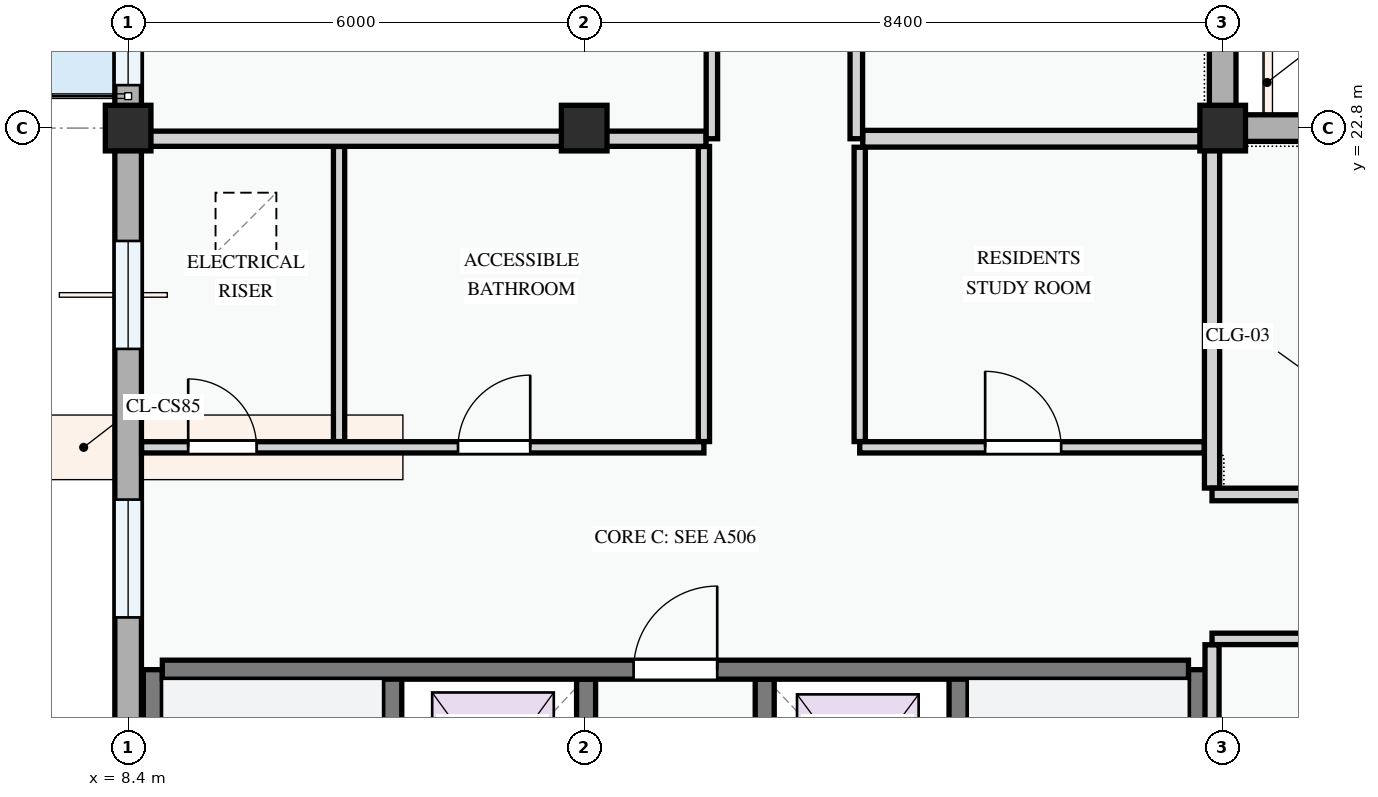
"""IFC4 building model, lengths in metres.
Left out: names, types, materials, properties, quantities, classifications, styles, units other than length and angle.
Written with IfcOpenShell. Run it as: python <this file> out.ifc"""

import sys

from ifc_helpers import new_model, si_unit, direction, frame, frame_2d, origin, origin_2d, place, context, subcontext, project, spatial, rectangle, extrude, element, fill, save


model = new_model("IFC4")
c1 = context("Model", 3, precision=1e-05, world=origin(), true_north=direction((0.0, 1.0)))
c2 = subcontext(c1, "Body", "Model", "MODEL_VIEW")
j1 = project(units=[si_unit("LENGTHUNIT", "METRE"), si_unit("PLANEANGLEUNIT", "RADIAN")], contexts=[c1])
p1 = place(None, origin())
s1 = spatial("IfcSite", under=j1, at=p1, CompositionType="ELEMENT")
p2 = place(p1, origin())
s2 = spatial("IfcBuilding", under=s1, at=p2, CompositionType="ELEMENT")
p3 = place(p2, frame((0.0, 0.0, 8.1)))
s3 = spatial("IfcBuildingStorey", under=s2, at=p3, CompositionType="ELEMENT", Elevation=8.1)
for number, where, z_axis, x_axis in (
    (1, (8.4, 22.8, 0.0), (0.0, 0.0, 1.0), (1.0, 0.0, 0.0)),
    (2, (14.4, 22.8, 0.0), (0.0, 0.0, 1.0), (1.0, 0.0, 0.0)),
    (3, (22.8, 22.8, 0.0), (0.0, 0.0, 1.0), (1.0, 0.0, 0.0)),
):
    element("IfcColumn", number, at=place(p3, frame(where, z_axis=z_axis, x_axis=x_axis)), inside=s3, PredefinedType="COLUMN", context=c2, shape_type="SweptSolid", body=[
        extrude(rectangle(XDim=0.6, YDim=0.6, at=origin_2d()), origin(), (0.0, 0.0, 1.0), 3.3),
    ])
p4 = place(p3, frame((22.8, 22.8, 0.0), z_axis=(0.0, 0.0, 1.0), x_axis=(0.0, 1.0, 0.0)))
e4 = element("IfcWall", 4, at=p4, inside=s3, PredefinedType="STANDARD", context=c2, shape_type="SweptSolid", body=[
    extrude(rectangle(XDim=6.0, YDim=0.35, at=frame_2d((3.0, 0.0))), origin(), (0.0, 0.0, 1.0), 2.575),
])
p5 = place(p4, frame((1.481, 0.0, 0.78)))
e5 = element("IfcOpeningElement", 5, at=p5, cuts=e4, PredefinedType="OPENING", context=c2, shape_type="SweptSolid", body=[
    extrude(rectangle(XDim=1.48, YDim=1.52, at=frame_2d((0.74, 0.76))), frame((0.0, 0.185, 0.0), z_axis=(0.0, -1.0, 0.0), x_axis=(1.0, 0.0, 0.0)), (0.0, 0.0, 1.0), 0.37),
])
p6 = place(p4, frame((4.581, 0.0, 0.78)))
e6 = element("IfcOpeningElement", 6, at=p6, cuts=e4, PredefinedType="OPENING", context=c2, shape_type="SweptSolid", body=[
    extrude(rectangle(XDim=0.9, YDim=1.2, at=frame_2d((0.45, 0.6))), frame((0.0, 0.185, 0.0), z_axis=(0.0, -1.0, 0.0), x_axis=(1.0, 0.0, 0.0)), (0.0, 0.0, 1.0), 0.37),
])
p7 = place(p3, frame((8.4, 28.8, 0.0), z_axis=(0.0, 0.0, 1.0), x_axis=(0.0, -1.0, 0.0)))
e7 = element("IfcWall", 7, at=p7, inside=s3, PredefinedType="STANDARD", context=c2, shape_type="SweptSolid", body=[
    extrude(rectangle(XDim=6.0, YDim=0.35, at=frame_2d((3.0, 0.0))), origin(), (0.0, 0.0, 1.0), 2.445),
])
p8 = place(p7, frame((2.14, 0.0, 0.0)))
e8 = element("IfcOpeningElement", 8, at=p8, cuts=e7, PredefinedType="OPENING", context=c2, shape_type="SweptSolid", body=[
    extrude(rectangle(XDim=1.25, YDim=2.2, at=frame_2d((0.625, 1.1))), frame((0.0, 0.185, 0.0), z_axis=(0.0, -1.0, 0.0), x_axis=(1.0, 0.0, 0.0)), (0.0, 0.0, 1.0), 0.37),
])
p9 = place(p7, frame((0.475, 0.0, 0.78)))
e9 = element("IfcOpeningElement", 9, at=p9, cuts=e7, PredefinedType="OPENING", context=c2, shape_type="SweptSolid", body=[
    extrude(rectangle(XDim=1.05, YDim=1.2, at=frame_2d((0.525, 0.6))), frame((0.0, 0.185, 0.0), z_axis=(0.0, -1.0, 0.0), x_axis=(1.0, 0.0, 0.0)), (0.0, 0.0, 1.0), 0.37),
])
p10 = place(p7, frame((3.815, 0.0, 0.78)))
e10 = element("IfcOpeningElement", 10, at=p10, cuts=e7, PredefinedType="OPENING", context=c2, shape_type="SweptSolid", body=[
    extrude(rectangle(XDim=1.62, YDim=1.38, at=frame_2d((0.81, 0.69))), frame((0.0, 0.185, 0.0), z_axis=(0.0, -1.0, 0.0), x_axis=(1.0, 0.0, 0.0)), (0.0, 0.0, 1.0), 0.37),
])
p11 = place(p3, frame((8.4, 22.8, 0.0), z_axis=(0.0, 0.0, 1.0), x_axis=(0.0, -1.0, 0.0)))
e11 = element("IfcWall", 11, at=p11, inside=s3, PredefinedType="STANDARD", context=c2, shape_type="SweptSolid", body=[
    extrude(rectangle(XDim=8.4, YDim=0.35, at=frame_2d((4.2, 0.0))), origin(), (0.0, 0.0, 1.0), 2.345),
])
p12 = place(p11, frame((1.485, 0.0, 0.78)))
e12 = element("IfcOpeningElement", 12, at=p12, cuts=e11, PredefinedType="OPENING", context=c2, shape_type="SweptSolid", body=[
    extrude(rectangle(XDim=1.42, YDim=1.38, at=frame_2d((0.71, 0.69))), frame((0.0, 0.185, 0.0), z_axis=(0.0, -1.0, 0.0), x_axis=(1.0, 0.0, 0.0)), (0.0, 0.0, 1.0), 0.37),
])
p13 = place(p11, frame((4.887, 0.0, 0.78)))
e13 = element("IfcOpeningElement", 13, at=p13, cuts=e11, PredefinedType="OPENING", context=c2, shape_type="SweptSolid", body=[
    extrude(rectangle(XDim=1.55, YDim=1.4, at=frame_2d((0.775, 0.7))), frame((0.0, 0.185, 0.0), z_axis=(0.0, -1.0, 0.0), x_axis=(1.0, 0.0, 0.0)), (0.0, 0.0, 1.0), 0.37),
])
p14 = place(p3, frame((28.8, 22.8, 0.0), z_axis=(0.0, 0.0, 1.0), x_axis=(-1.0, 0.0, 0.0)))
e14 = element("IfcWall", 14, at=p14, inside=s3, PredefinedType="STANDARD", context=c2, shape_type="SweptSolid", body=[
    extrude(rectangle(XDim=6.0, YDim=0.35, at=frame_2d((3.0, 0.0))), origin(), (0.0, 0.0, 1.0), 2.475),
])
p15 = place(p14, frame((0.519, 0.0, 0.78)))
e15 = element("IfcOpeningElement", 15, at=p15, cuts=e14, PredefinedType="OPENING", context=c2, shape_type="SweptSolid", body=[
    extrude(rectangle(XDim=0.9, YDim=1.2, at=frame_2d((0.45, 0.6))), frame((0.0, 0.185, 0.0), z_axis=(0.0, -1.0, 0.0), x_axis=(1.0, 0.0, 0.0)), (0.0, 0.0, 1.0), 0.37),
])
p16 = place(p14, frame((3.004, 0.0, 0.78)))
e16 = element("IfcOpeningElement", 16, at=p16, cuts=e14, PredefinedType="OPENING", context=c2, shape_type="SweptSolid", body=[
    extrude(rectangle(XDim=1.55, YDim=1.4, at=frame_2d((0.775, 0.7))), frame((0.0, 0.185, 0.0), z_axis=(0.0, -1.0, 0.0), x_axis=(1.0, 0.0, 0.0)), (0.0, 0.0, 1.0), 0.37),
])
p17 = place(p3, frame((11.875, 8.75, 0.0), z_axis=(0.0, 0.0, 1.0), x_axis=(0.0, 1.0, 0.0)))
e17 = element("IfcWall", 17, at=p17, inside=s3, PredefinedType="SHEAR", context=c2, shape_type="SweptSolid", body=[
    extrude(rectangle(XDim=6.925, YDim=0.25, at=frame_2d((3.462, 0.0))), origin(), (0.0, 0.0, 1.0), 3.0),
])
p18 = place(p17, frame((0.35, 0.0, 0.0)))
e18 = element("IfcOpeningElement", 18, at=p18, cuts=e17, PredefinedType="OPENING", context=c2, shape_type="SweptSolid", body=[
    extrude(rectangle(XDim=0.95, YDim=2.1, at=frame_2d((0.475, 1.05))), frame((0.0, 0.135, 0.0), z_axis=(0.0, -1.0, 0.0), x_axis=(1.0, 0.0, 0.0)), (0.0, 0.0, 1.0), 0.27),
])
p19 = place(p3, frame((8.725, 8.6, 0.0), z_axis=(0.0, 0.0, 1.0), x_axis=(0.0, 1.0, 0.0)))
e19 = element("IfcWall", 19, at=p19, inside=s3, PredefinedType="SHEAR", context=c2, shape_type="SweptSolid", body=[
    extrude(rectangle(XDim=7.075, YDim=0.25, at=frame_2d((3.538, 0.0))), origin(), (0.0, 0.0, 1.0), 3.0),
])
p20 = place(p3, frame((22.475, 8.75, 0.0), z_axis=(0.0, 0.0, 1.0), x_axis=(0.0, 1.0, 0.0)))
e20 = element("IfcWall", 20, at=p20, inside=s3, PredefinedType="SHEAR", context=c2, shape_type="SweptSolid", body=[
    extrude(rectangle(XDim=6.925, YDim=0.25, at=frame_2d((3.462, 0.0))), origin(), (0.0, 0.0, 1.0), 3.0),
])
p21 = place(p3, frame((19.325, 8.75, 0.0), z_axis=(0.0, 0.0, 1.0), x_axis=(0.0, 1.0, 0.0)))
e21 = element("IfcWall", 21, at=p21, inside=s3, PredefinedType="SHEAR", context=c2, shape_type="SweptSolid", body=[
    extrude(rectangle(XDim=6.925, YDim=0.25, at=frame_2d((3.462, 0.0))), origin(), (0.0, 0.0, 1.0), 3.0),
])
p22 = place(p21, frame((0.35, 0.0, 0.0)))
e22 = element("IfcOpeningElement", 22, at=p22, cuts=e21, PredefinedType="OPENING", context=c2, shape_type="SweptSolid", body=[
    extrude(rectangle(XDim=0.95, YDim=2.1, at=frame_2d((0.475, 1.05))), frame((0.0, 0.135, 0.0), z_axis=(0.0, -1.0, 0.0), x_axis=(1.0, 0.0, 0.0)), (0.0, 0.0, 1.0), 0.27),
])
for number, where, z_axis, x_axis in (
    (23, (14.425, 13.125, 0.0), (0.0, 0.0, 1.0), (0.0, 1.0, 0.0)),
    (24, (16.775, 13.125, 0.0), (0.0, 0.0, 1.0), (0.0, 1.0, 0.0)),
):
    element("IfcWall", number, at=place(p3, frame(where, z_axis=z_axis, x_axis=x_axis)), inside=s3, PredefinedType="SHEAR", context=c2, shape_type="SweptSolid", body=[
        extrude(rectangle(XDim=2.425, YDim=0.25, at=frame_2d((1.212, 0.0))), origin(), (0.0, 0.0, 1.0), 3.0),
    ])
p23 = place(p3, frame((8.85, 15.675, 0.0), z_axis=(0.0, 0.0, 1.0), x_axis=(1.0, 0.0, 0.0)))
e25 = element("IfcWall", 25, at=p23, inside=s3, PredefinedType="SHEAR", context=c2, shape_type="SweptSolid", body=[
    extrude(rectangle(XDim=13.5, YDim=0.25, at=frame_2d((6.75, 0.0))), origin(), (0.0, 0.0, 1.0), 3.0),
])
p24 = place(p23, frame((6.2, 0.0, 0.0)))
e26 = element("IfcOpeningElement", 26, at=p24, cuts=e25, PredefinedType="OPENING", context=c2, shape_type="SweptSolid", body=[
    extrude(rectangle(XDim=1.1, YDim=2.15, at=frame_2d((0.55, 1.075))), frame((0.0, 0.135, 0.0), z_axis=(0.0, -1.0, 0.0), x_axis=(1.0, 0.0, 0.0)), (0.0, 0.0, 1.0), 0.27),
])
for number, where, z_axis, x_axis in (
    (27, (11.175, 18.676, 0.0), (0.0, 0.0, 1.0), (0.0, 1.0, 0.0)),
    (28, (15.975, 18.676, 0.0), (0.0, 0.0, 1.0), (0.0, 1.0, 0.0)),
):
    element("IfcWall", number, at=place(p3, frame(where, z_axis=z_axis, x_axis=x_axis)), inside=s3, PredefinedType="PARTITIONING", context=c2, shape_type="SweptSolid", body=[
        extrude(rectangle(XDim=3.882, YDim=0.148, at=frame_2d((1.941, 0.0))), origin(), (0.0, 0.0, 1.0), 3.0),
    ])
p25 = place(p3, frame((18.025, 18.676, 0.0), z_axis=(0.0, 0.0, 1.0), x_axis=(0.0, 1.0, 0.0)))
e29 = element("IfcWall", 29, at=p25, inside=s3, PredefinedType="PARTITIONING", context=c2, shape_type="SweptSolid", body=[
    extrude(rectangle(XDim=3.872, YDim=0.148, at=frame_2d((1.936, 0.0))), origin(), (0.0, 0.0, 1.0), 3.0),
])
p26 = place(p3, frame((8.577, 18.6, 0.0), z_axis=(0.0, 0.0, 1.0), x_axis=(1.0, 0.0, 0.0)))
e30 = element("IfcWall", 30, at=p26, inside=s3, PredefinedType="PARTITIONING", context=c2, shape_type="SweptSolid", body=[
    extrude(rectangle(XDim=7.398, YDim=0.148, at=frame_2d((3.699, 0.0))), origin(), (0.0, 0.0, 1.0), 3.0),
])
p27 = place(p26, frame((0.613, 0.0, 0.0)))
e31 = element("IfcOpeningElement", 31, at=p27, cuts=e30, PredefinedType="OPENING", context=c2, shape_type="SweptSolid", body=[
    extrude(rectangle(XDim=0.9, YDim=2.1, at=frame_2d((0.45, 1.05))), frame((0.0, 0.084, 0.0), z_axis=(0.0, -1.0, 0.0), x_axis=(1.0, 0.0, 0.0)), (0.0, 0.0, 1.0), 0.168),
])
p28 = place(p26, frame((4.163, 0.0, 0.0)))
e32 = element("IfcOpeningElement", 32, at=p28, cuts=e30, PredefinedType="OPENING", context=c2, shape_type="SweptSolid", body=[
    extrude(rectangle(XDim=0.95, YDim=2.1, at=frame_2d((0.475, 1.05))), frame((0.0, 0.084, 0.0), z_axis=(0.0, -1.0, 0.0), x_axis=(1.0, 0.0, 0.0)), (0.0, 0.0, 1.0), 0.168),
])
p29 = place(p3, frame((18.025, 18.6, 0.0), z_axis=(0.0, 0.0, 1.0), x_axis=(1.0, 0.0, 0.0)))
e33 = element("IfcWall", 33, at=p29, inside=s3, PredefinedType="PARTITIONING", context=c2, shape_type="SweptSolid", body=[
    extrude(rectangle(XDim=4.533, YDim=0.148, at=frame_2d((2.267, 0.0))), origin(), (0.0, 0.0, 1.0), 3.0),
])
p30 = place(p29, frame((1.65, 0.0, 0.0)))
e34 = element("IfcOpeningElement", 34, at=p30, cuts=e33, PredefinedType="OPENING", context=c2, shape_type="SweptSolid", body=[
    extrude(rectangle(XDim=1.0, YDim=2.15, at=frame_2d((0.5, 1.075))), frame((0.0, 0.084, 0.0), z_axis=(0.0, -1.0, 0.0), x_axis=(1.0, 0.0, 0.0)), (0.0, 0.0, 1.0), 0.168),
])
p31 = place(p3, frame((8.577, 22.66, 0.0), z_axis=(0.0, 0.0, 1.0), x_axis=(1.0, 0.0, 0.0)))
e35 = element("IfcWall", 35, at=p31, inside=s3, PredefinedType="PARTITIONING", context=c2, shape_type="SweptSolid", body=[
    extrude(rectangle(XDim=7.426, YDim=0.2, at=frame_2d((3.713, 0.0))), origin(), (0.0, 0.0, 1.0), 2.375),
])
p32 = place(p3, frame((18.064, 22.66, 0.0), z_axis=(0.0, 0.0, 1.0), x_axis=(1.0, 0.0, 0.0)))
e36 = element("IfcWall", 36, at=p32, inside=s3, PredefinedType="PARTITIONING", context=c2, shape_type="SweptSolid", body=[
    extrude(rectangle(XDim=4.494, YDim=0.22, at=frame_2d((2.247, 0.0))), origin(), (0.0, 0.0, 1.0), 2.375),
])
p33 = place(p3, frame((16.08, 22.66, 0.0), z_axis=(0.0, 0.0, 1.0), x_axis=(0.0, 1.0, 0.0)))
e37 = element("IfcWall", 37, at=p33, inside=s3, PredefinedType="PARTITIONING", context=c2, shape_type="SweptSolid", body=[
    extrude(rectangle(XDim=34.763, YDim=0.15, at=frame_2d((17.382, 0.0))), origin(), (0.0, 0.0, 1.0), 3.0),
])
p34 = place(p33, frame((2.672, 0.0, 0.0)))
e38 = element("IfcOpeningElement", 38, at=p34, cuts=e37, PredefinedType="OPENING", context=c2, shape_type="SweptSolid", body=[
    extrude(rectangle(XDim=0.96, YDim=2.12, at=frame_2d((0.48, 1.06))), frame((0.0, 0.085, 0.0), z_axis=(0.0, -1.0, 0.0), x_axis=(1.0, 0.0, 0.0)), (0.0, 0.0, 1.0), 0.17),
])
p35 = place(p33, frame((16.58, 0.0, 0.0)))
e39 = element("IfcOpeningElement", 39, at=p35, cuts=e37, PredefinedType="OPENING", context=c2, shape_type="SweptSolid", body=[
    extrude(rectangle(XDim=0.92, YDim=2.1, at=frame_2d((0.46, 1.05))), frame((0.0, 0.085, 0.0), z_axis=(0.0, -1.0, 0.0), x_axis=(1.0, 0.0, 0.0)), (0.0, 0.0, 1.0), 0.17),
])
p36 = place(p33, frame((24.315, 0.0, 0.0)))
e40 = element("IfcOpeningElement", 40, at=p36, cuts=e37, PredefinedType="OPENING", context=c2, shape_type="SweptSolid", body=[
    extrude(rectangle(XDim=0.92, YDim=2.1, at=frame_2d((0.46, 1.05))), frame((0.0, 0.085, 0.0), z_axis=(0.0, -1.0, 0.0), x_axis=(1.0, 0.0, 0.0)), (0.0, 0.0, 1.0), 0.17),
])
p37 = place(p3, frame((17.98, 22.66, 0.0), z_axis=(0.0, 0.0, 1.0), x_axis=(0.0, 1.0, 0.0)))
e41 = element("IfcWall", 41, at=p37, inside=s3, PredefinedType="PARTITIONING", context=c2, shape_type="SweptSolid", body=[
    extrude(rectangle(XDim=34.763, YDim=0.165, at=frame_2d((17.382, 0.0))), origin(), (0.0, 0.0, 1.0), 3.0),
])
p38 = place(p37, frame((2.633, 0.0, 0.0)))
e42 = element("IfcOpeningElement", 42, at=p38, cuts=e41, PredefinedType="OPENING", context=c2, shape_type="SweptSolid", body=[
    extrude(rectangle(XDim=0.92, YDim=2.1, at=frame_2d((0.46, 1.05))), frame((0.0, 0.093, 0.0), z_axis=(0.0, -1.0, 0.0), x_axis=(1.0, 0.0, 0.0)), (0.0, 0.0, 1.0), 0.185),
])
p39 = place(p37, frame((16.343, 0.0, 0.0)))
e43 = element("IfcOpeningElement", 43, at=p39, cuts=e41, PredefinedType="OPENING", context=c2, shape_type="SweptSolid", body=[
    extrude(rectangle(XDim=0.92, YDim=2.1, at=frame_2d((0.46, 1.05))), frame((0.0, 0.093, 0.0), z_axis=(0.0, -1.0, 0.0), x_axis=(1.0, 0.0, 0.0)), (0.0, 0.0, 1.0), 0.185),
])
p40 = place(p37, frame((24.313, 0.0, 0.0)))
e44 = element("IfcOpeningElement", 44, at=p40, cuts=e41, PredefinedType="OPENING", context=c2, shape_type="SweptSolid", body=[
    extrude(rectangle(XDim=0.96, YDim=2.12, at=frame_2d((0.48, 1.06))), frame((0.0, 0.093, 0.0), z_axis=(0.0, -1.0, 0.0), x_axis=(1.0, 0.0, 0.0)), (0.0, 0.0, 1.0), 0.185),
])
p41 = place(p3, frame((22.66, 8.577, 0.0), z_axis=(0.0, 0.0, 1.0), x_axis=(0.0, 1.0, 0.0)))
e45 = element("IfcWall", 45, at=p41, inside=s3, PredefinedType="PARTITIONING", context=c2, shape_type="SweptSolid", body=[
    extrude(rectangle(XDim=7.426, YDim=0.185, at=frame_2d((3.713, 0.0))), origin(), (0.0, 0.0, 1.0), 2.425),
])
p42 = place(p3, frame((22.66, 18.064, 0.0), z_axis=(0.0, 0.0, 1.0), x_axis=(0.0, 1.0, 0.0)))
e46 = element("IfcWall", 46, at=p42, inside=s3, PredefinedType="PARTITIONING", context=c2, shape_type="SweptSolid", body=[
    extrude(rectangle(XDim=4.676, YDim=0.2, at=frame_2d((2.338, 0.0))), origin(), (0.0, 0.0, 1.0), 2.425),
])
p43 = place(p3, frame((22.66, 16.08, 0.0), z_axis=(0.0, 0.0, 1.0), x_axis=(1.0, 0.0, 0.0)))
e47 = element("IfcWall", 47, at=p43, inside=s3, PredefinedType="PARTITIONING", context=c2, shape_type="SweptSolid", body=[
    extrude(rectangle(XDim=34.763, YDim=0.15, at=frame_2d((17.382, 0.0))), origin(), (0.0, 0.0, 1.0), 3.0),
])
p44 = place(p43, frame((2.672, 0.0, 0.0)))
e48 = element("IfcOpeningElement", 48, at=p44, cuts=e47, PredefinedType="OPENING", context=c2, shape_type="SweptSolid", body=[
    extrude(rectangle(XDim=0.92, YDim=2.1, at=frame_2d((0.46, 1.05))), frame((0.0, 0.085, 0.0), z_axis=(0.0, -1.0, 0.0), x_axis=(1.0, 0.0, 0.0)), (0.0, 0.0, 1.0), 0.17),
])
p45 = place(p43, frame((16.58, 0.0, 0.0)))
e49 = element("IfcOpeningElement", 49, at=p45, cuts=e47, PredefinedType="OPENING", context=c2, shape_type="SweptSolid", body=[
    extrude(rectangle(XDim=0.96, YDim=2.12, at=frame_2d((0.48, 1.06))), frame((0.0, 0.085, 0.0), z_axis=(0.0, -1.0, 0.0), x_axis=(1.0, 0.0, 0.0)), (0.0, 0.0, 1.0), 0.17),
])
p46 = place(p43, frame((24.315, 0.0, 0.0)))
e50 = element("IfcOpeningElement", 50, at=p46, cuts=e47, PredefinedType="OPENING", context=c2, shape_type="SweptSolid", body=[
    extrude(rectangle(XDim=0.92, YDim=2.1, at=frame_2d((0.46, 1.05))), frame((0.0, 0.085, 0.0), z_axis=(0.0, -1.0, 0.0), x_axis=(1.0, 0.0, 0.0)), (0.0, 0.0, 1.0), 0.17),
])
p47 = place(p3, frame((22.66, 17.98, 0.0), z_axis=(0.0, 0.0, 1.0), x_axis=(1.0, 0.0, 0.0)))
e51 = element("IfcWall", 51, at=p47, inside=s3, PredefinedType="PARTITIONING", context=c2, shape_type="SweptSolid", body=[
    extrude(rectangle(XDim=34.763, YDim=0.165, at=frame_2d((17.382, 0.0))), origin(), (0.0, 0.0, 1.0), 3.0),
])
p48 = place(p47, frame((2.633, 0.0, 0.0)))
e52 = element("IfcOpeningElement", 52, at=p48, cuts=e51, PredefinedType="OPENING", context=c2, shape_type="SweptSolid", body=[
    extrude(rectangle(XDim=0.92, YDim=2.1, at=frame_2d((0.46, 1.05))), frame((0.0, 0.093, 0.0), z_axis=(0.0, -1.0, 0.0), x_axis=(1.0, 0.0, 0.0)), (0.0, 0.0, 1.0), 0.185),
])
p49 = place(p47, frame((16.343, 0.0, 0.0)))
e53 = element("IfcOpeningElement", 53, at=p49, cuts=e51, PredefinedType="OPENING", context=c2, shape_type="SweptSolid", body=[
    extrude(rectangle(XDim=0.92, YDim=2.1, at=frame_2d((0.46, 1.05))), frame((0.0, 0.093, 0.0), z_axis=(0.0, -1.0, 0.0), x_axis=(1.0, 0.0, 0.0)), (0.0, 0.0, 1.0), 0.185),
])
p50 = place(p47, frame((24.313, 0.0, 0.0)))
e54 = element("IfcOpeningElement", 54, at=p50, cuts=e51, PredefinedType="OPENING", context=c2, shape_type="SweptSolid", body=[
    extrude(rectangle(XDim=0.92, YDim=2.1, at=frame_2d((0.46, 1.05))), frame((0.0, 0.093, 0.0), z_axis=(0.0, -1.0, 0.0), x_axis=(1.0, 0.0, 0.0)), (0.0, 0.0, 1.0), 0.185),
])
p51 = place(p10, origin())
e55 = element("IfcWindow", 55, at=p51, inside=s3, PartitioningType="DOUBLE_PANEL_VERTICAL", PredefinedType="WINDOW", context=c2, shape_type="SweptSolid", body=[
    extrude(rectangle(XDim=1.62, YDim=1.38, at=frame_2d((0.81, 0.69))), frame((0.0, 0.03, 0.0), z_axis=(0.0, -1.0, 0.0), x_axis=(1.0, 0.0, 0.0)), (0.0, 0.0, 1.0), 0.06),
])
fill(e10, e55)
p52 = place(p12, origin())
e56 = element("IfcWindow", 56, at=p52, inside=s3, PartitioningType="SINGLE_PANEL", PredefinedType="WINDOW", context=c2, shape_type="SweptSolid", body=[
    extrude(rectangle(XDim=1.42, YDim=1.38, at=frame_2d((0.71, 0.69))), frame((0.0, 0.03, 0.0), z_axis=(0.0, -1.0, 0.0), x_axis=(1.0, 0.0, 0.0)), (0.0, 0.0, 1.0), 0.06),
])
fill(e12, e56)
p53 = place(p13, origin())
e57 = element("IfcWindow", 57, at=p53, inside=s3, PartitioningType="SINGLE_PANEL", PredefinedType="WINDOW", context=c2, shape_type="SweptSolid", body=[
    extrude(rectangle(XDim=1.55, YDim=1.4, at=frame_2d((0.775, 0.7))), frame((0.0, 0.03, 0.0), z_axis=(0.0, -1.0, 0.0), x_axis=(1.0, 0.0, 0.0)), (0.0, 0.0, 1.0), 0.06),
])
fill(e13, e57)
p54 = place(p24, origin())
e58 = element("IfcDoor", 58, at=p54, inside=s3, OperationType="SINGLE_SWING_RIGHT", PredefinedType="DOOR", context=c2, shape_type="SweptSolid", body=[
    extrude(rectangle(XDim=1.1, YDim=2.15, at=frame_2d((0.55, 1.075))), frame((0.0, 0.025, 0.0), z_axis=(0.0, -1.0, 0.0), x_axis=(1.0, 0.0, 0.0)), (0.0, 0.0, 1.0), 0.05),
])
fill(e26, e58)
p55 = place(p27, origin())
e59 = element("IfcDoor", 59, at=p55, inside=s3, OperationType="SINGLE_SWING_LEFT", PredefinedType="DOOR", context=c2, shape_type="SweptSolid", body=[
    extrude(rectangle(XDim=0.9, YDim=2.1, at=frame_2d((0.45, 1.05))), frame((0.0, 0.025, 0.0), z_axis=(0.0, -1.0, 0.0), x_axis=(1.0, 0.0, 0.0)), (0.0, 0.0, 1.0), 0.05),
])
fill(e31, e59)
p56 = place(p28, origin())
e60 = element("IfcDoor", 60, at=p56, inside=s3, OperationType="SINGLE_SWING_RIGHT", PredefinedType="DOOR", context=c2, shape_type="SweptSolid", body=[
    extrude(rectangle(XDim=0.95, YDim=2.1, at=frame_2d((0.475, 1.05))), frame((0.0, 0.025, 0.0), z_axis=(0.0, -1.0, 0.0), x_axis=(1.0, 0.0, 0.0)), (0.0, 0.0, 1.0), 0.05),
])
fill(e32, e60)
p57 = place(p30, origin())
e61 = element("IfcDoor", 61, at=p57, inside=s3, OperationType="SINGLE_SWING_LEFT", PredefinedType="DOOR", context=c2, shape_type="SweptSolid", body=[
    extrude(rectangle(XDim=1.0, YDim=2.15, at=frame_2d((0.5, 1.075))), frame((0.0, 0.025, 0.0), z_axis=(0.0, -1.0, 0.0), x_axis=(1.0, 0.0, 0.0)), (0.0, 0.0, 1.0), 0.05),
])
fill(e34, e61)
save(model, sys.argv[1])
